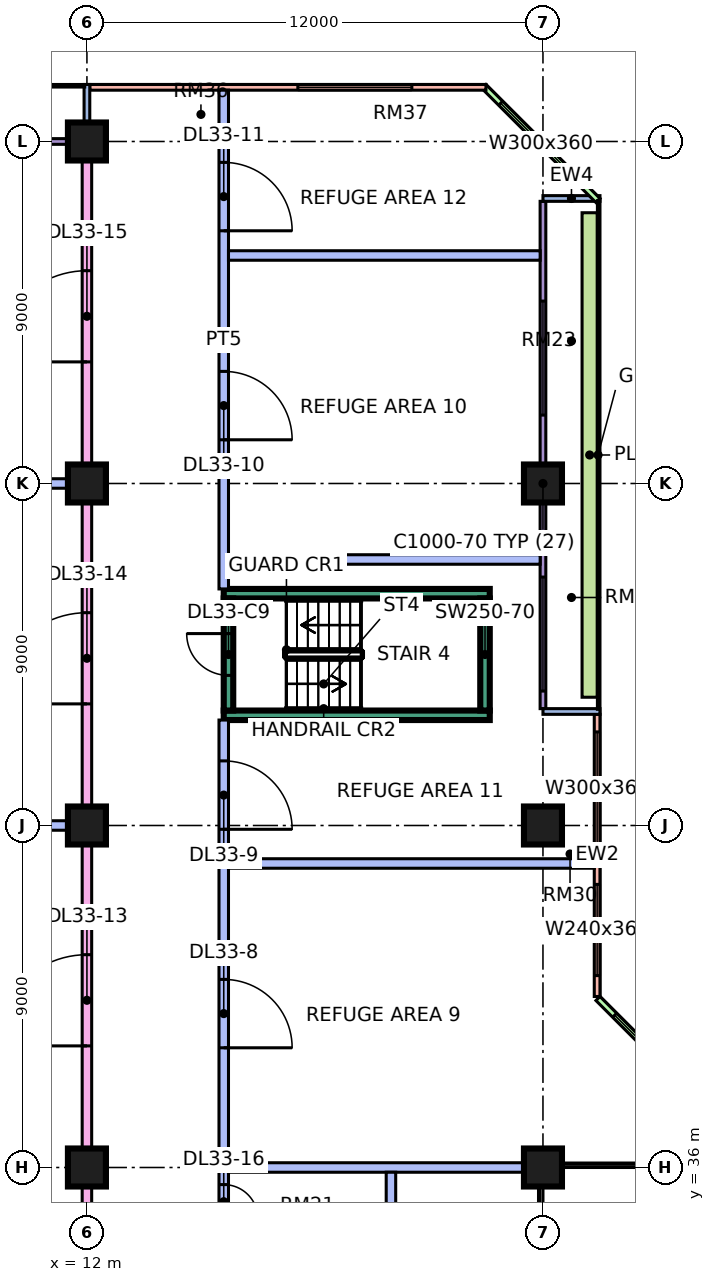
"""IFC4 building model, lengths in metres.
Left out: names, types, materials, properties, quantities, classifications, styles, units other than length and angle.
Written with IfcOpenShell. Run it as: python <this file> out.ifc"""

import sys

from ifc_helpers import new_model, si_unit, direction, frame, frame_2d, origin, origin_2d, place, context, subcontext, project, spatial, rectangle, extrude, element, fill, save


model = new_model("IFC4")
c1 = context("Model", 3, precision=1e-05, world=origin(), true_north=direction((0.0, 1.0)))
c2 = subcontext(c1, "Body", "Model", "MODEL_VIEW")
j1 = project(units=[si_unit("LENGTHUNIT", "METRE"), si_unit("PLANEANGLEUNIT", "RADIAN")], contexts=[c1])
p1 = place(None, origin())
s1 = spatial("IfcSite", under=j1, at=p1, CompositionType="ELEMENT")
p2 = place(p1, origin())
s2 = spatial("IfcBuilding", under=s1, at=p2, CompositionType="ELEMENT")
p3 = place(p2, frame((0.0, 0.0, 140.65)))
s3 = spatial("IfcBuildingStorey", under=s2, at=p3, CompositionType="ELEMENT", Elevation=140.65)
for number, where, z_axis, x_axis in (
    (1, (12.0, 36.0, 0.0), (0.0, 0.0, 1.0), (1.0, 0.0, 0.0)),
    (2, (12.0, 45.0, 0.0), (0.0, 0.0, 1.0), (1.0, 0.0, 0.0)),
    (3, (12.0, 54.0, 0.0), (0.0, 0.0, 1.0), (1.0, 0.0, 0.0)),
    (4, (12.0, 63.0, 0.0), (0.0, 0.0, 1.0), (1.0, 0.0, 0.0)),
    (5, (24.0, 36.0, 0.0), (0.0, 0.0, 1.0), (1.0, 0.0, 0.0)),
    (6, (24.0, 45.0, 0.0), (0.0, 0.0, 1.0), (1.0, 0.0, 0.0)),
    (7, (24.0, 54.0, 0.0), (0.0, 0.0, 1.0), (1.0, 0.0, 0.0)),
):
    element("IfcColumn", number, at=place(p3, frame(where, z_axis=z_axis, x_axis=x_axis)), inside=s3, PredefinedType="COLUMN", context=c2, shape_type="SweptSolid", body=[
        extrude(rectangle(XDim=1.0, YDim=1.0, at=origin_2d()), origin(), (0.0, 0.0, 1.0), 5.5),
    ])
for number, where, z_axis, x_axis in (
    (8, (15.6, 47.9, 0.0), (0.0, 0.0, 1.0), (1.0, 0.0, 0.0)),
    (9, (15.6, 51.1, 0.0), (0.0, 0.0, 1.0), (1.0, 0.0, 0.0)),
):
    element("IfcWall", number, at=place(p3, frame(where, z_axis=z_axis, x_axis=x_axis)), inside=s3, PredefinedType="SHEAR", context=c2, shape_type="SweptSolid", body=[
        extrude(rectangle(XDim=7.0, YDim=0.25, at=frame_2d((3.5, 0.0))), origin(), (0.0, 0.0, 1.0), 5.5),
    ])
p4 = place(p3, frame((15.725, 48.025, 0.0), z_axis=(0.0, 0.0, 1.0), x_axis=(0.0, 1.0, 0.0)))
e10 = element("IfcWall", 10, at=p4, inside=s3, PredefinedType="SHEAR", context=c2, shape_type="SweptSolid", body=[
    extrude(rectangle(XDim=2.95, YDim=0.25, at=frame_2d((1.475, 0.0))), origin(), (0.0, 0.0, 1.0), 5.5),
])
p5 = place(p4, frame((0.925, 0.0, 0.0)))
e11 = element("IfcOpeningElement", 11, at=p5, cuts=e10, PredefinedType="OPENING", context=c2, shape_type="SweptSolid", body=[
    extrude(rectangle(XDim=1.1, YDim=2.2, at=frame_2d((0.55, 1.1))), frame((0.0, 0.135, 0.0), z_axis=(0.0, -1.0, 0.0), x_axis=(1.0, 0.0, 0.0)), (0.0, 0.0, 1.0), 0.27),
])
p6 = place(p3, frame((22.475, 48.025, 0.0), z_axis=(0.0, 0.0, 1.0), x_axis=(0.0, 1.0, 0.0)))
e12 = element("IfcWall", 12, at=p6, inside=s3, PredefinedType="SHEAR", context=c2, shape_type="SweptSolid", body=[
    extrude(rectangle(XDim=2.95, YDim=0.25, at=frame_2d((1.475, 0.0))), origin(), (0.0, 0.0, 1.0), 5.5),
])
p7 = place(p3, frame((28.447, 37.447, 0.0), z_axis=(0.0, 0.0, 1.0), x_axis=(-0.707106781187, 0.707106781187, 0.0)))
e13 = element("IfcWall", 13, at=p7, inside=s3, PredefinedType="SOLIDWALL", context=c2, shape_type="SweptSolid", body=[
    extrude(rectangle(XDim=4.243, YDim=0.15, at=frame_2d((2.121, 0.0))), origin(), (0.0, 0.0, 1.0), 5.05),
])
p8 = place(p7, frame((0.621, 0.0, 0.45)))
e14 = element("IfcOpeningElement", 14, at=p8, cuts=e13, PredefinedType="OPENING", context=c2, shape_type="SweptSolid", body=[
    extrude(rectangle(XDim=3.0, YDim=3.6, at=frame_2d((1.5, 1.8))), frame((0.0, 0.085, 0.0), z_axis=(0.0, -1.0, 0.0), x_axis=(1.0, 0.0, 0.0)), (0.0, 0.0, 1.0), 0.17),
])
p9 = place(p3, frame((25.425, 40.5, 0.0), z_axis=(0.0, 0.0, 1.0), x_axis=(0.0, 1.0, 0.0)))
e15 = element("IfcWall", 15, at=p9, inside=s3, PredefinedType="SOLIDWALL", context=c2, shape_type="SweptSolid", body=[
    extrude(rectangle(XDim=7.425, YDim=0.15, at=frame_2d((3.712, 0.0))), origin(), (0.0, 0.0, 1.0), 5.05),
])
p10 = place(p9, frame((0.55, 0.0, 0.45)))
e16 = element("IfcOpeningElement", 16, at=p10, cuts=e15, PredefinedType="OPENING", context=c2, shape_type="SweptSolid", body=[
    extrude(rectangle(XDim=2.4, YDim=3.6, at=frame_2d((1.2, 1.8))), frame((0.0, 0.085, 0.0), z_axis=(0.0, -1.0, 0.0), x_axis=(1.0, 0.0, 0.0)), (0.0, 0.0, 1.0), 0.17),
])
p11 = place(p9, frame((3.962, 0.0, 0.45)))
e17 = element("IfcOpeningElement", 17, at=p11, cuts=e15, PredefinedType="OPENING", context=c2, shape_type="SweptSolid", body=[
    extrude(rectangle(XDim=3.0, YDim=3.6, at=frame_2d((1.5, 1.8))), frame((0.0, 0.085, 0.0), z_axis=(0.0, -1.0, 0.0), x_axis=(1.0, 0.0, 0.0)), (0.0, 0.0, 1.0), 0.17),
])
p12 = place(p3, frame((24.0, 48.075, 0.0), z_axis=(0.0, 0.0, 1.0), x_axis=(0.0, 1.0, 0.0)))
e18 = element("IfcWall", 18, at=p12, inside=s3, PredefinedType="SOLIDWALL", context=c2, shape_type="SweptSolid", body=[
    extrude(rectangle(XDim=13.35, YDim=0.15, at=frame_2d((6.675, 0.0))), origin(), (0.0, 0.0, 1.0), 5.05),
])
p13 = place(p12, frame((0.462, 0.0, 0.45)))
e19 = element("IfcOpeningElement", 19, at=p13, cuts=e18, PredefinedType="OPENING", context=c2, shape_type="SweptSolid", body=[
    extrude(rectangle(XDim=3.0, YDim=3.6, at=frame_2d((1.5, 1.8))), frame((0.0, 0.085, 0.0), z_axis=(0.0, -1.0, 0.0), x_axis=(1.0, 0.0, 0.0)), (0.0, 0.0, 1.0), 0.17),
])
p14 = place(p12, frame((7.725, 0.0, 0.45)))
e20 = element("IfcOpeningElement", 20, at=p14, cuts=e18, PredefinedType="OPENING", context=c2, shape_type="SweptSolid", body=[
    extrude(rectangle(XDim=3.0, YDim=3.6, at=frame_2d((1.5, 1.8))), frame((0.0, 0.085, 0.0), z_axis=(0.0, -1.0, 0.0), x_axis=(1.0, 0.0, 0.0)), (0.0, 0.0, 1.0), 0.17),
])
for number, where, z_axis, x_axis in (
    (21, (25.5, 48.0, 0.0), (0.0, 0.0, 1.0), (-1.0, 0.0, 0.0)),
    (22, (25.5, 61.5, 0.0), (0.0, 0.0, 1.0), (-1.0, 0.0, 0.0)),
):
    element("IfcWall", number, at=place(p3, frame(where, z_axis=z_axis, x_axis=x_axis)), inside=s3, PredefinedType="SOLIDWALL", context=c2, shape_type="SweptSolid", body=[
        extrude(rectangle(XDim=1.5, YDim=0.15, at=frame_2d((0.75, 0.0))), origin(), (0.0, 0.0, 1.0), 5.05),
    ])
p15 = place(p3, frame((25.447, 61.447, 0.0), z_axis=(0.0, 0.0, 1.0), x_axis=(-0.707106781187, 0.707106781187, 0.0)))
e23 = element("IfcWall", 23, at=p15, inside=s3, PredefinedType="SOLIDWALL", context=c2, shape_type="SweptSolid", body=[
    extrude(rectangle(XDim=4.243, YDim=0.15, at=frame_2d((2.121, 0.0))), origin(), (0.0, 0.0, 1.0), 5.05),
])
p16 = place(p15, frame((0.621, 0.0, 0.45)))
e24 = element("IfcOpeningElement", 24, at=p16, cuts=e23, PredefinedType="OPENING", context=c2, shape_type="SweptSolid", body=[
    extrude(rectangle(XDim=3.0, YDim=3.6, at=frame_2d((1.5, 1.8))), frame((0.0, 0.085, 0.0), z_axis=(0.0, -1.0, 0.0), x_axis=(1.0, 0.0, 0.0)), (0.0, 0.0, 1.0), 0.17),
])
p17 = place(p3, frame((22.5, 64.425, 0.0), z_axis=(0.0, 0.0, 1.0), x_axis=(-1.0, 0.0, 0.0)))
e25 = element("IfcWall", 25, at=p17, inside=s3, PredefinedType="SOLIDWALL", context=c2, shape_type="SweptSolid", body=[
    extrude(rectangle(XDim=10.425, YDim=0.15, at=frame_2d((5.212, 0.0))), origin(), (0.0, 0.0, 1.0), 5.05),
])
p18 = place(p17, frame((1.95, 0.0, 0.45)))
e26 = element("IfcOpeningElement", 26, at=p18, cuts=e25, PredefinedType="OPENING", context=c2, shape_type="SweptSolid", body=[
    extrude(rectangle(XDim=3.0, YDim=3.6, at=frame_2d((1.5, 1.8))), frame((0.0, 0.085, 0.0), z_axis=(0.0, -1.0, 0.0), x_axis=(1.0, 0.0, 0.0)), (0.0, 0.0, 1.0), 0.17),
])
p19 = place(p3, frame((11.925, 63.0, 0.0), z_axis=(0.0, 0.0, 1.0), x_axis=(-1.0, 0.0, 0.0)))
e27 = element("IfcWall", 27, at=p19, inside=s3, PredefinedType="SOLIDWALL", context=c2, shape_type="SweptSolid", body=[
    extrude(rectangle(XDim=10.35, YDim=0.15, at=frame_2d((5.175, 0.0))), origin(), (0.0, 0.0, 1.0), 5.05),
])
p20 = place(p19, frame((3.938, 0.0, 0.45)))
e28 = element("IfcOpeningElement", 28, at=p20, cuts=e27, PredefinedType="OPENING", context=c2, shape_type="SweptSolid", body=[
    extrude(rectangle(XDim=3.0, YDim=3.6, at=frame_2d((1.5, 1.8))), frame((0.0, 0.085, 0.0), z_axis=(0.0, -1.0, 0.0), x_axis=(1.0, 0.0, 0.0)), (0.0, 0.0, 1.0), 0.17),
])
p21 = place(p3, frame((12.0, 64.5, 0.0), z_axis=(0.0, 0.0, 1.0), x_axis=(0.0, -1.0, 0.0)))
e29 = element("IfcWall", 29, at=p21, inside=s3, PredefinedType="SOLIDWALL", context=c2, shape_type="SweptSolid", body=[
    extrude(rectangle(XDim=1.5, YDim=0.15, at=frame_2d((0.75, 0.0))), origin(), (0.0, 0.0, 1.0), 5.05),
])
p22 = place(p3, frame((25.229, 48.375, 0.0), z_axis=(0.0, 0.0, 1.0), x_axis=(0.0, 1.0, 0.0)))
e30 = element("IfcWall", 30, at=p22, inside=s3, PredefinedType="SOLIDWALL", context=c2, shape_type="SweptSolid", body=[
    extrude(rectangle(XDim=12.75, YDim=0.4, at=frame_2d((6.375, 0.0))), origin(), (0.0, 0.0, 1.0), 0.7),
])
p23 = place(p3, frame((0.0, 45.0, 0.0), z_axis=(0.0, 0.0, 1.0), x_axis=(1.0, 0.0, 0.0)))
e31 = element("IfcWall", 31, at=p23, inside=s3, PredefinedType="PARTITIONING", context=c2, shape_type="SweptSolid", body=[
    extrude(rectangle(XDim=11.875, YDim=0.25, at=frame_2d((5.938, 0.0))), origin(), (0.0, 0.0, 1.0), 5.05),
])
p24 = place(p3, frame((0.074, 54.0, 0.0), z_axis=(0.0, 0.0, 1.0), x_axis=(1.0, 0.0, 0.0)))
e32 = element("IfcWall", 32, at=p24, inside=s3, PredefinedType="PARTITIONING", context=c2, shape_type="SweptSolid", body=[
    extrude(rectangle(XDim=11.801, YDim=0.25, at=frame_2d((5.9, 0.0))), origin(), (0.0, 0.0, 1.0), 5.05),
])
p25 = place(p3, frame((12.0, 22.875, 0.0), z_axis=(0.0, 0.0, 1.0), x_axis=(0.0, 1.0, 0.0)))
e33 = element("IfcWall", 33, at=p25, inside=s3, PredefinedType="PARTITIONING", context=c2, shape_type="SweptSolid", body=[
    extrude(rectangle(XDim=40.125, YDim=0.25, at=frame_2d((20.062, 0.0))), origin(), (0.0, 0.0, 1.0), 2.45),
])
p26 = place(p25, frame((16.325, 0.0, 0.0)))
e34 = element("IfcOpeningElement", 34, at=p26, cuts=e33, PredefinedType="OPENING", context=c2, shape_type="SweptSolid", body=[
    extrude(rectangle(XDim=2.4, YDim=2.1, at=frame_2d((1.2, 1.05))), frame((0.0, 0.135, 0.0), z_axis=(0.0, -1.0, 0.0), x_axis=(1.0, 0.0, 0.0)), (0.0, 0.0, 1.0), 0.27),
])
p27 = place(p25, frame((25.325, 0.0, 0.0)))
e35 = element("IfcOpeningElement", 35, at=p27, cuts=e33, PredefinedType="OPENING", context=c2, shape_type="SweptSolid", body=[
    extrude(rectangle(XDim=2.4, YDim=2.1, at=frame_2d((1.2, 1.05))), frame((0.0, 0.135, 0.0), z_axis=(0.0, -1.0, 0.0), x_axis=(1.0, 0.0, 0.0)), (0.0, 0.0, 1.0), 0.27),
])
p28 = place(p25, frame((34.325, 0.0, 0.0)))
e36 = element("IfcOpeningElement", 36, at=p28, cuts=e33, PredefinedType="OPENING", context=c2, shape_type="SweptSolid", body=[
    extrude(rectangle(XDim=2.4, YDim=2.1, at=frame_2d((1.2, 1.05))), frame((0.0, 0.135, 0.0), z_axis=(0.0, -1.0, 0.0), x_axis=(1.0, 0.0, 0.0)), (0.0, 0.0, 1.0), 0.27),
])
p29 = place(p3, frame((15.6, 20.0, 0.0), z_axis=(0.0, 0.0, 1.0), x_axis=(0.0, 1.0, 0.0)))
e37 = element("IfcWall", 37, at=p29, inside=s3, PredefinedType="PARTITIONING", context=c2, shape_type="SweptSolid", body=[
    extrude(rectangle(XDim=27.775, YDim=0.25, at=frame_2d((13.887, 0.0))), origin(), (0.0, 0.0, 1.0), 5.05),
])
p30 = place(p29, frame((19.15, 0.0, 0.0)))
e38 = element("IfcOpeningElement", 38, at=p30, cuts=e37, PredefinedType="OPENING", context=c2, shape_type="SweptSolid", body=[
    extrude(rectangle(XDim=1.8, YDim=2.1, at=frame_2d((0.9, 1.05))), frame((0.0, 0.135, 0.0), z_axis=(0.0, -1.0, 0.0), x_axis=(1.0, 0.0, 0.0)), (0.0, 0.0, 1.0), 0.27),
])
p31 = place(p29, frame((24.9, 0.0, 0.0)))
e39 = element("IfcOpeningElement", 39, at=p31, cuts=e37, PredefinedType="OPENING", context=c2, shape_type="SweptSolid", body=[
    extrude(rectangle(XDim=1.8, YDim=2.1, at=frame_2d((0.9, 1.05))), frame((0.0, 0.135, 0.0), z_axis=(0.0, -1.0, 0.0), x_axis=(1.0, 0.0, 0.0)), (0.0, 0.0, 1.0), 0.27),
])
p32 = place(p29, frame((14.65, 0.0, 0.0)))
e40 = element("IfcOpeningElement", 40, at=p32, cuts=e37, PredefinedType="OPENING", context=c2, shape_type="SweptSolid", body=[
    extrude(rectangle(XDim=0.9, YDim=2.1, at=frame_2d((0.45, 1.05))), frame((0.0, 0.135, 0.0), z_axis=(0.0, -1.0, 0.0), x_axis=(1.0, 0.0, 0.0)), (0.0, 0.0, 1.0), 0.27),
])
p33 = place(p29, frame((11.4, 0.0, 0.0)))
e41 = element("IfcOpeningElement", 41, at=p33, cuts=e37, PredefinedType="OPENING", context=c2, shape_type="SweptSolid", body=[
    extrude(rectangle(XDim=0.9, YDim=2.1, at=frame_2d((0.45, 1.05))), frame((0.0, 0.135, 0.0), z_axis=(0.0, -1.0, 0.0), x_axis=(1.0, 0.0, 0.0)), (0.0, 0.0, 1.0), 0.27),
])
p34 = place(p3, frame((15.6, 51.225, 0.0), z_axis=(0.0, 0.0, 1.0), x_axis=(0.0, 1.0, 0.0)))
e42 = element("IfcWall", 42, at=p34, inside=s3, PredefinedType="PARTITIONING", context=c2, shape_type="SweptSolid", body=[
    extrude(rectangle(XDim=13.125, YDim=0.25, at=frame_2d((6.562, 0.0))), origin(), (0.0, 0.0, 1.0), 5.05),
])
p35 = place(p34, frame((3.925, 0.0, 0.0)))
e43 = element("IfcOpeningElement", 43, at=p35, cuts=e42, PredefinedType="OPENING", context=c2, shape_type="SweptSolid", body=[
    extrude(rectangle(XDim=1.8, YDim=2.1, at=frame_2d((0.9, 1.05))), frame((0.0, 0.135, 0.0), z_axis=(0.0, -1.0, 0.0), x_axis=(1.0, 0.0, 0.0)), (0.0, 0.0, 1.0), 0.27),
])
p36 = place(p34, frame((9.425, 0.0, 0.0)))
e44 = element("IfcOpeningElement", 44, at=p36, cuts=e42, PredefinedType="OPENING", context=c2, shape_type="SweptSolid", body=[
    extrude(rectangle(XDim=1.8, YDim=2.1, at=frame_2d((0.9, 1.05))), frame((0.0, 0.135, 0.0), z_axis=(0.0, -1.0, 0.0), x_axis=(1.0, 0.0, 0.0)), (0.0, 0.0, 1.0), 0.27),
])
p37 = place(p3, frame((15.725, 36.0, 0.0), z_axis=(0.0, 0.0, 1.0), x_axis=(1.0, 0.0, 0.0)))
e45 = element("IfcWall", 45, at=p37, inside=s3, PredefinedType="PARTITIONING", context=c2, shape_type="SweptSolid", body=[
    extrude(rectangle(XDim=8.275, YDim=0.25, at=frame_2d((4.137, 0.0))), origin(), (0.0, 0.0, 1.0), 5.05),
])
p38 = place(p3, frame((15.725, 44.0, 0.0), z_axis=(0.0, 0.0, 1.0), x_axis=(1.0, 0.0, 0.0)))
e46 = element("IfcWall", 46, at=p38, inside=s3, PredefinedType="PARTITIONING", context=c2, shape_type="SweptSolid", body=[
    extrude(rectangle(XDim=9.625, YDim=0.25, at=frame_2d((4.812, 0.0))), origin(), (0.0, 0.0, 1.0), 5.05),
])
for number, where, z_axis, x_axis in (
    (47, (15.725, 52.0, 0.0), (0.0, 0.0, 1.0), (1.0, 0.0, 0.0)),
    (48, (15.725, 60.0, 0.0), (0.0, 0.0, 1.0), (1.0, 0.0, 0.0)),
):
    element("IfcWall", number, at=place(p3, frame(where, z_axis=z_axis, x_axis=x_axis)), inside=s3, PredefinedType="PARTITIONING", context=c2, shape_type="SweptSolid", body=[
        extrude(rectangle(XDim=8.201, YDim=0.25, at=frame_2d((4.101, 0.0))), origin(), (0.0, 0.0, 1.0), 5.05),
    ])
p39 = place(p3, frame((20.0, 23.875, 0.0), z_axis=(0.0, 0.0, 1.0), x_axis=(0.0, 1.0, 0.0)))
e49 = element("IfcWall", 49, at=p39, inside=s3, PredefinedType="PARTITIONING", context=c2, shape_type="SweptSolid", body=[
    extrude(rectangle(XDim=12.0, YDim=0.25, at=frame_2d((6.0, 0.0))), origin(), (0.0, 0.0, 1.0), 5.05),
])
p40 = place(p39, frame((2.325, 0.0, 0.0)))
e50 = element("IfcOpeningElement", 50, at=p40, cuts=e49, PredefinedType="OPENING", context=c2, shape_type="SweptSolid", body=[
    extrude(rectangle(XDim=0.9, YDim=2.1, at=frame_2d((0.45, 1.05))), frame((0.0, 0.135, 0.0), z_axis=(0.0, -1.0, 0.0), x_axis=(1.0, 0.0, 0.0)), (0.0, 0.0, 1.0), 0.27),
])
p41 = place(p8, origin())
e51 = element("IfcWindow", 51, at=p41, inside=s3, PartitioningType="SINGLE_PANEL", PredefinedType="WINDOW", context=c2, shape_type="SweptSolid", body=[
    extrude(rectangle(XDim=3.0, YDim=3.6, at=frame_2d((1.5, 1.8))), frame((0.0, 0.03, 0.0), z_axis=(0.0, -1.0, 0.0), x_axis=(1.0, 0.0, 0.0)), (0.0, 0.0, 1.0), 0.06),
])
fill(e14, e51)
p42 = place(p10, origin())
e52 = element("IfcWindow", 52, at=p42, inside=s3, PartitioningType="SINGLE_PANEL", PredefinedType="WINDOW", context=c2, shape_type="SweptSolid", body=[
    extrude(rectangle(XDim=2.4, YDim=3.6, at=frame_2d((1.2, 1.8))), frame((0.0, 0.03, 0.0), z_axis=(0.0, -1.0, 0.0), x_axis=(1.0, 0.0, 0.0)), (0.0, 0.0, 1.0), 0.06),
])
fill(e16, e52)
p43 = place(p11, origin())
e53 = element("IfcWindow", 53, at=p43, inside=s3, PartitioningType="SINGLE_PANEL", PredefinedType="WINDOW", context=c2, shape_type="SweptSolid", body=[
    extrude(rectangle(XDim=3.0, YDim=3.6, at=frame_2d((1.5, 1.8))), frame((0.0, 0.03, 0.0), z_axis=(0.0, -1.0, 0.0), x_axis=(1.0, 0.0, 0.0)), (0.0, 0.0, 1.0), 0.06),
])
fill(e17, e53)
p44 = place(p13, origin())
e54 = element("IfcWindow", 54, at=p44, inside=s3, PartitioningType="SINGLE_PANEL", PredefinedType="WINDOW", context=c2, shape_type="SweptSolid", body=[
    extrude(rectangle(XDim=3.0, YDim=3.6, at=frame_2d((1.5, 1.8))), frame((0.0, 0.03, 0.0), z_axis=(0.0, -1.0, 0.0), x_axis=(1.0, 0.0, 0.0)), (0.0, 0.0, 1.0), 0.06),
])
fill(e19, e54)
p45 = place(p14, origin())
e55 = element("IfcWindow", 55, at=p45, inside=s3, PartitioningType="SINGLE_PANEL", PredefinedType="WINDOW", context=c2, shape_type="SweptSolid", body=[
    extrude(rectangle(XDim=3.0, YDim=3.6, at=frame_2d((1.5, 1.8))), frame((0.0, 0.03, 0.0), z_axis=(0.0, -1.0, 0.0), x_axis=(1.0, 0.0, 0.0)), (0.0, 0.0, 1.0), 0.06),
])
fill(e20, e55)
p46 = place(p16, origin())
e56 = element("IfcWindow", 56, at=p46, inside=s3, PartitioningType="SINGLE_PANEL", PredefinedType="WINDOW", context=c2, shape_type="SweptSolid", body=[
    extrude(rectangle(XDim=3.0, YDim=3.6, at=frame_2d((1.5, 1.8))), frame((0.0, 0.03, 0.0), z_axis=(0.0, -1.0, 0.0), x_axis=(1.0, 0.0, 0.0)), (0.0, 0.0, 1.0), 0.06),
])
fill(e24, e56)
p47 = place(p18, origin())
e57 = element("IfcWindow", 57, at=p47, inside=s3, PartitioningType="SINGLE_PANEL", PredefinedType="WINDOW", context=c2, shape_type="SweptSolid", body=[
    extrude(rectangle(XDim=3.0, YDim=3.6, at=frame_2d((1.5, 1.8))), frame((0.0, 0.03, 0.0), z_axis=(0.0, -1.0, 0.0), x_axis=(1.0, 0.0, 0.0)), (0.0, 0.0, 1.0), 0.06),
])
fill(e26, e57)
p48 = place(p5, frame((1.1, 0.0, 0.0), z_axis=(0.0, 0.0, 1.0), x_axis=(-1.0, 0.0, 0.0)))
e58 = element("IfcDoor", 58, at=p48, inside=s3, OperationType="SINGLE_SWING_RIGHT", PredefinedType="DOOR", context=c2, shape_type="SweptSolid", body=[
    extrude(rectangle(XDim=1.1, YDim=2.2, at=frame_2d((0.55, 1.1))), frame((0.0, 0.025, 0.0), z_axis=(0.0, -1.0, 0.0), x_axis=(1.0, 0.0, 0.0)), (0.0, 0.0, 1.0), 0.05),
])
fill(e11, e58)
p49 = place(p30, frame((1.8, 0.0, 0.0), z_axis=(0.0, 0.0, 1.0), x_axis=(-1.0, 0.0, 0.0)))
e59 = element("IfcDoor", 59, at=p49, inside=s3, OperationType="DOUBLE_DOOR_SINGLE_SWING", PredefinedType="DOOR", context=c2, shape_type="SweptSolid", body=[
    extrude(rectangle(XDim=1.8, YDim=2.1, at=frame_2d((0.9, 1.05))), frame((0.0, 0.025, 0.0), z_axis=(0.0, -1.0, 0.0), x_axis=(1.0, 0.0, 0.0)), (0.0, 0.0, 1.0), 0.05),
])
fill(e38, e59)
p50 = place(p31, frame((1.8, 0.0, 0.0), z_axis=(0.0, 0.0, 1.0), x_axis=(-1.0, 0.0, 0.0)))
e60 = element("IfcDoor", 60, at=p50, inside=s3, OperationType="DOUBLE_DOOR_SINGLE_SWING", PredefinedType="DOOR", context=c2, shape_type="SweptSolid", body=[
    extrude(rectangle(XDim=1.8, YDim=2.1, at=frame_2d((0.9, 1.05))), frame((0.0, 0.025, 0.0), z_axis=(0.0, -1.0, 0.0), x_axis=(1.0, 0.0, 0.0)), (0.0, 0.0, 1.0), 0.05),
])
fill(e39, e60)
p51 = place(p35, frame((1.8, 0.0, 0.0), z_axis=(0.0, 0.0, 1.0), x_axis=(-1.0, 0.0, 0.0)))
e61 = element("IfcDoor", 61, at=p51, inside=s3, OperationType="DOUBLE_DOOR_SINGLE_SWING", PredefinedType="DOOR", context=c2, shape_type="SweptSolid", body=[
    extrude(rectangle(XDim=1.8, YDim=2.1, at=frame_2d((0.9, 1.05))), frame((0.0, 0.025, 0.0), z_axis=(0.0, -1.0, 0.0), x_axis=(1.0, 0.0, 0.0)), (0.0, 0.0, 1.0), 0.05),
])
fill(e43, e61)
p52 = place(p36, frame((1.8, 0.0, 0.0), z_axis=(0.0, 0.0, 1.0), x_axis=(-1.0, 0.0, 0.0)))
e62 = element("IfcDoor", 62, at=p52, inside=s3, OperationType="DOUBLE_DOOR_SINGLE_SWING", PredefinedType="DOOR", context=c2, shape_type="SweptSolid", body=[
    extrude(rectangle(XDim=1.8, YDim=2.1, at=frame_2d((0.9, 1.05))), frame((0.0, 0.025, 0.0), z_axis=(0.0, -1.0, 0.0), x_axis=(1.0, 0.0, 0.0)), (0.0, 0.0, 1.0), 0.05),
])
fill(e44, e62)
p53 = place(p26, origin())
e63 = element("IfcDoor", 63, at=p53, inside=s3, OperationType="DOUBLE_DOOR_SINGLE_SWING", PredefinedType="DOOR", context=c2, shape_type="SweptSolid", body=[
    extrude(rectangle(XDim=2.4, YDim=2.1, at=frame_2d((1.2, 1.05))), frame((0.0, 0.025, 0.0), z_axis=(0.0, -1.0, 0.0), x_axis=(1.0, 0.0, 0.0)), (0.0, 0.0, 1.0), 0.05),
])
fill(e34, e63)
p54 = place(p27, origin())
e64 = element("IfcDoor", 64, at=p54, inside=s3, OperationType="DOUBLE_DOOR_SINGLE_SWING", PredefinedType="DOOR", context=c2, shape_type="SweptSolid", body=[
    extrude(rectangle(XDim=2.4, YDim=2.1, at=frame_2d((1.2, 1.05))), frame((0.0, 0.025, 0.0), z_axis=(0.0, -1.0, 0.0), x_axis=(1.0, 0.0, 0.0)), (0.0, 0.0, 1.0), 0.05),
])
fill(e35, e64)
p55 = place(p28, origin())
e65 = element("IfcDoor", 65, at=p55, inside=s3, OperationType="DOUBLE_DOOR_SINGLE_SWING", PredefinedType="DOOR", context=c2, shape_type="SweptSolid", body=[
    extrude(rectangle(XDim=2.4, YDim=2.1, at=frame_2d((1.2, 1.05))), frame((0.0, 0.025, 0.0), z_axis=(0.0, -1.0, 0.0), x_axis=(1.0, 0.0, 0.0)), (0.0, 0.0, 1.0), 0.05),
])
fill(e36, e65)
p56 = place(p32, frame((0.9, 0.0, 0.0), z_axis=(0.0, 0.0, 1.0), x_axis=(-1.0, 0.0, 0.0)))
e66 = element("IfcDoor", 66, at=p56, inside=s3, OperationType="SINGLE_SWING_LEFT", PredefinedType="DOOR", context=c2, shape_type="SweptSolid", body=[
    extrude(rectangle(XDim=0.9, YDim=2.1, at=frame_2d((0.45, 1.05))), frame((0.0, 0.025, 0.0), z_axis=(0.0, -1.0, 0.0), x_axis=(1.0, 0.0, 0.0)), (0.0, 0.0, 1.0), 0.05),
])
fill(e40, e66)
save(model, sys.argv[1])
